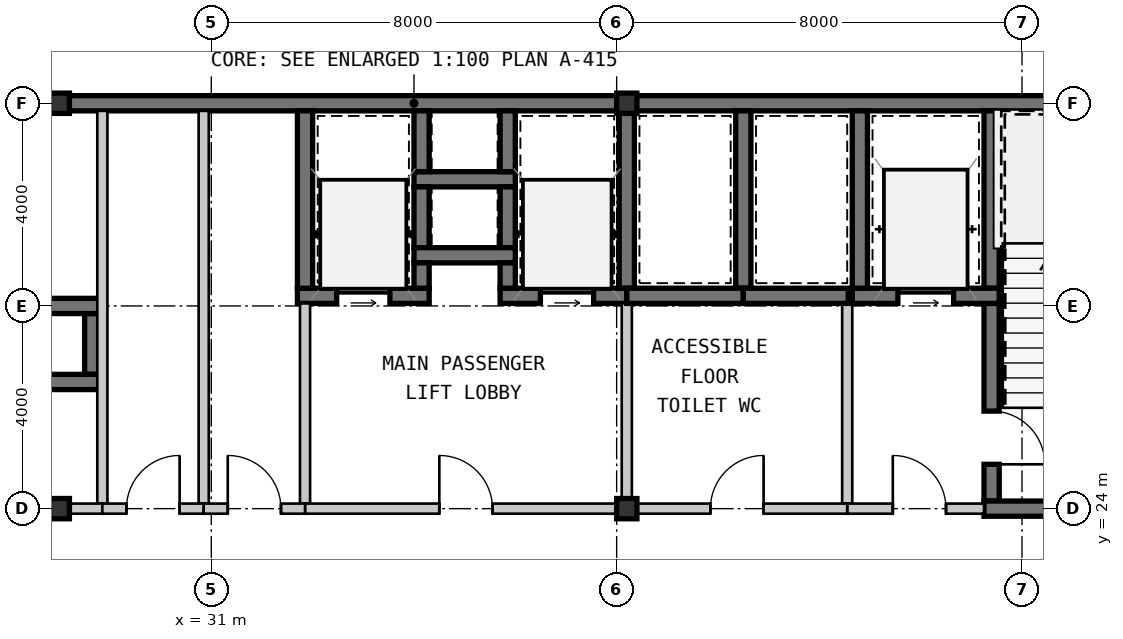
"""IFC4 building model, lengths in metres.
Left out: names, types, materials, properties, quantities, classifications, styles, units other than length and angle.
Written with IfcOpenShell. Run it as: python <this file> out.ifc"""

import sys

from ifc_helpers import new_model, si_unit, direction, frame, frame_2d, origin, origin_2d, place, context, subcontext, project, spatial, rectangle, hollow_rectangle, extrude, source, transform, mapped, element, fill, save


model = new_model("IFC4")
c1 = context("Model", 3, precision=1e-05, world=origin(), true_north=direction((0.0, 1.0)))
c2 = subcontext(c1, "Body", "Model", "MODEL_VIEW")
j1 = project(units=[si_unit("LENGTHUNIT", "METRE"), si_unit("PLANEANGLEUNIT", "RADIAN")], contexts=[c1])
p1 = place(None, origin())
s1 = spatial("IfcSite", under=j1, at=p1, CompositionType="ELEMENT")
p2 = place(p1, origin())
s2 = spatial("IfcBuilding", under=s1, at=p2, CompositionType="ELEMENT")
p3 = place(p2, frame((0.0, 0.0, 151.9)))
s3 = spatial("IfcBuildingStorey", under=s2, at=p3, CompositionType="ELEMENT", Elevation=151.9)
m1 = source(origin(), c2, "Body", "SweptSolid", [
    extrude(hollow_rectangle(XDim=0.4, YDim=0.4, WallThickness=0.016, at=origin_2d()), origin(), (0.0, 0.0, 1.0), 3.15),
])
for number, where, z_axis, x_axis in (
    (1, (28.0, 24.0, 0.0), (0.0, 0.0, 1.0), (1.0, 0.0, 0.0)),
    (2, (39.2, 24.0, 0.0), (0.0, 0.0, 1.0), (1.0, 0.0, 0.0)),
    (3, (28.0, 32.0, 0.0), (0.0, 0.0, 1.0), (1.0, 0.0, 0.0)),
    (4, (39.2, 32.0, 0.0), (0.0, 0.0, 1.0), (1.0, 0.0, 0.0)),
):
    element("IfcColumn", number, at=place(p3, frame(where, z_axis=z_axis, x_axis=x_axis)), inside=s3, PredefinedType="COLUMN", context=c2, shape_type="MappedRepresentation", body=[
        mapped(m1, transform((0.0, 0.0, 0.0), scale=1.0)),
    ])
m2 = source(origin(), c2, "Body", "SweptSolid", [
    extrude(rectangle(XDim=9.15, YDim=0.3, at=frame_2d((4.575, 0.0))), origin(), (0.0, 0.0, 1.0), 2.93),
])
p4 = place(p3, frame((18.85, 32.0, 0.0), z_axis=(0.0, 0.0, 1.0), x_axis=(1.0, 0.0, 0.0)))
e5 = element("IfcWall", 5, at=p4, inside=s3, PredefinedType="SHEAR", context=c2, shape_type="MappedRepresentation", body=[
    mapped(m2, transform((0.0, 0.0, 0.0), scale=1.0)),
])
m3 = source(origin(), c2, "Body", "SweptSolid", [
    extrude(rectangle(XDim=11.2, YDim=0.3, at=frame_2d((5.6, 0.0))), origin(), (0.0, 0.0, 1.0), 2.93),
])
p5 = place(p3, frame((28.0, 32.0, 0.0), z_axis=(0.0, 0.0, 1.0), x_axis=(1.0, 0.0, 0.0)))
e6 = element("IfcWall", 6, at=p5, inside=s3, PredefinedType="SHEAR", context=c2, shape_type="MappedRepresentation", body=[
    mapped(m3, transform((0.0, 0.0, 0.0), scale=1.0)),
])
m4 = source(origin(), c2, "Body", "SweptSolid", [
    extrude(rectangle(XDim=11.95, YDim=0.3, at=frame_2d((5.975, 0.0))), origin(), (0.0, 0.0, 1.0), 2.93),
])
p6 = place(p3, frame((39.2, 32.0, 0.0), z_axis=(0.0, 0.0, 1.0), x_axis=(1.0, 0.0, 0.0)))
e7 = element("IfcWall", 7, at=p6, inside=s3, PredefinedType="SHEAR", context=c2, shape_type="MappedRepresentation", body=[
    mapped(m4, transform((0.0, 0.0, 0.0), scale=1.0)),
])
m5 = source(origin(), c2, "Body", "SweptSolid", [
    extrude(rectangle(XDim=3.5, YDim=0.3, at=frame_2d((1.75, 0.0))), origin(), (0.0, 0.0, 1.0), 2.93),
])
p7 = place(p3, frame((46.4, 31.85, 0.0), z_axis=(0.0, 0.0, 1.0), x_axis=(0.0, -1.0, 0.0)))
e8 = element("IfcWall", 8, at=p7, inside=s3, PredefinedType="SHEAR", context=c2, shape_type="MappedRepresentation", body=[
    mapped(m5, transform((0.0, 0.0, 0.0), scale=1.0)),
])
m6 = source(origin(), c2, "Body", "SweptSolid", [
    extrude(rectangle(XDim=3.9, YDim=0.3, at=frame_2d((1.95, 0.0))), origin(), (0.0, 0.0, 1.0), 2.93),
])
p8 = place(p3, frame((46.4, 28.05, 0.0), z_axis=(0.0, 0.0, 1.0), x_axis=(0.0, -1.0, 0.0)))
e9 = element("IfcWall", 9, at=p8, inside=s3, PredefinedType="SHEAR", context=c2, shape_type="MappedRepresentation", body=[
    mapped(m6, transform((0.0, 0.0, 0.0), scale=1.0)),
])
m7 = source(origin(), c2, "Body", "SweptSolid", [
    extrude(rectangle(XDim=1.05, YDim=2.1, at=frame_2d((0.525, 1.05))), frame((0.0, 0.16, 0.0), z_axis=(0.0, -1.0, 0.0), x_axis=(1.0, 0.0, 0.0)), (0.0, 0.0, 1.0), 0.32),
])
p9 = place(p8, frame((2.125, 0.0, 0.0)))
e10 = element("IfcOpeningElement", 10, at=p9, cuts=e9, PredefinedType="OPENING", context=c2, shape_type="MappedRepresentation", body=[
    mapped(m7, transform((0.0, 0.0, 0.0), scale=1.0)),
])
m8 = source(origin(), c2, "Body", "SweptSolid", [
    extrude(rectangle(XDim=4.9, YDim=0.3, at=frame_2d((2.45, 0.0))), origin(), (0.0, 0.0, 1.0), 2.93),
])
p10 = place(p3, frame((46.25, 24.0, 0.0), z_axis=(0.0, 0.0, 1.0), x_axis=(1.0, 0.0, 0.0)))
e11 = element("IfcWall", 11, at=p10, inside=s3, PredefinedType="SHEAR", context=c2, shape_type="MappedRepresentation", body=[
    mapped(m8, transform((0.0, 0.0, 0.0), scale=1.0)),
])
m9 = source(origin(), c2, "Body", "SweptSolid", [
    extrude(rectangle(XDim=2.9, YDim=0.3, at=frame_2d((1.45, 0.0))), origin(), (0.0, 0.0, 1.0), 2.93),
])
p11 = place(p3, frame((43.65, 28.2, 0.0), z_axis=(0.0, 0.0, 1.0), x_axis=(1.0, 0.0, 0.0)))
e12 = element("IfcWall", 12, at=p11, inside=s3, PredefinedType="SHEAR", context=c2, shape_type="MappedRepresentation", body=[
    mapped(m9, transform((0.0, 0.0, 0.0), scale=1.0)),
])
m10 = source(origin(), c2, "Body", "SweptSolid", [
    extrude(rectangle(XDim=1.1, YDim=2.15, at=frame_2d((0.55, 1.075))), frame((0.0, 0.16, 0.0), z_axis=(0.0, -1.0, 0.0), x_axis=(1.0, 0.0, 0.0)), (0.0, 0.0, 1.0), 0.32),
])
p12 = place(p11, frame((0.9, 0.0, 0.0)))
e13 = element("IfcOpeningElement", 13, at=p12, cuts=e12, PredefinedType="OPENING", context=c2, shape_type="MappedRepresentation", body=[
    mapped(m10, transform((0.0, 0.0, 0.0), scale=1.0)),
])
p13 = place(p3, frame((43.8, 31.85, 0.0), z_axis=(0.0, 0.0, 1.0), x_axis=(0.0, -1.0, 0.0)))
e14 = element("IfcWall", 14, at=p13, inside=s3, PredefinedType="SHEAR", context=c2, shape_type="MappedRepresentation", body=[
    mapped(m5, transform((0.0, 0.0, 0.0), scale=1.0)),
])
m11 = source(origin(), c2, "Body", "SweptSolid", [
    extrude(rectangle(XDim=3.95, YDim=0.2, at=frame_2d((1.975, 0.0))), origin(), (0.0, 0.0, 1.0), 2.93),
])
p14 = place(p3, frame((43.55, 28.05, 0.0), z_axis=(0.0, 0.0, 1.0), x_axis=(0.0, -1.0, 0.0)))
e15 = element("IfcWall", 15, at=p14, inside=s3, PredefinedType="SOLIDWALL", context=c2, shape_type="MappedRepresentation", body=[
    mapped(m11, transform((0.0, 0.0, 0.0), scale=1.0)),
])
m12 = source(origin(), c2, "Body", "SweptSolid", [
    extrude(rectangle(XDim=2.7, YDim=0.2, at=frame_2d((1.35, 0.0))), origin(), (0.0, 0.0, 1.0), 2.397),
])
p15 = place(p3, frame((43.55, 24.0, 0.0), z_axis=(0.0, 0.0, 1.0), x_axis=(1.0, 0.0, 0.0)))
e16 = element("IfcWall", 16, at=p15, inside=s3, PredefinedType="SOLIDWALL", context=c2, shape_type="MappedRepresentation", body=[
    mapped(m12, transform((0.0, 0.0, 0.0), scale=1.0)),
])
m13 = source(origin(), c2, "Body", "SweptSolid", [
    extrude(rectangle(XDim=1.05, YDim=2.1, at=frame_2d((0.525, 1.05))), frame((0.0, 0.11, 0.0), z_axis=(0.0, -1.0, 0.0), x_axis=(1.0, 0.0, 0.0)), (0.0, 0.0, 1.0), 0.22),
])
p16 = place(p15, frame((0.9, 0.0, 0.0)))
e17 = element("IfcOpeningElement", 17, at=p16, cuts=e16, PredefinedType="OPENING", context=c2, shape_type="MappedRepresentation", body=[
    mapped(m13, transform((0.0, 0.0, 0.0), scale=1.0)),
])
m14 = source(origin(), c2, "Body", "SweptSolid", [
    extrude(rectangle(XDim=2.0, YDim=0.3, at=frame_2d((1.0, 0.0))), origin(), (0.0, 0.0, 1.0), 2.93),
])
p17 = place(p3, frame((35.0, 30.5, 0.0), z_axis=(0.0, 0.0, 1.0), x_axis=(1.0, 0.0, 0.0)))
e18 = element("IfcWall", 18, at=p17, inside=s3, PredefinedType="SHEAR", context=c2, shape_type="MappedRepresentation", body=[
    mapped(m14, transform((0.0, 0.0, 0.0), scale=1.0)),
])
m15 = source(origin(), c2, "Body", "SweptSolid", [
    extrude(rectangle(XDim=1.2, YDim=0.3, at=frame_2d((0.6, 0.0))), origin(), (0.0, 0.0, 1.0), 2.93),
])
for number, where, z_axis, x_axis in (
    (19, (35.15, 31.85, 0.0), (0.0, 0.0, 1.0), (0.0, -1.0, 0.0)),
    (20, (36.85, 30.65, 0.0), (0.0, 0.0, 1.0), (0.0, 1.0, 0.0)),
    (21, (35.15, 30.35, 0.0), (0.0, 0.0, 1.0), (0.0, -1.0, 0.0)),
    (22, (36.85, 29.15, 0.0), (0.0, 0.0, 1.0), (0.0, 1.0, 0.0)),
):
    element("IfcWall", number, at=place(p3, frame(where, z_axis=z_axis, x_axis=x_axis)), inside=s3, PredefinedType="SHEAR", context=c2, shape_type="MappedRepresentation", body=[
        mapped(m15, transform((0.0, 0.0, 0.0), scale=1.0)),
    ])
p18 = place(p3, frame((35.0, 29.0, 0.0), z_axis=(0.0, 0.0, 1.0), x_axis=(1.0, 0.0, 0.0)))
e23 = element("IfcWall", 23, at=p18, inside=s3, PredefinedType="SHEAR", context=c2, shape_type="MappedRepresentation", body=[
    mapped(m14, transform((0.0, 0.0, 0.0), scale=1.0)),
])
p19 = place(p3, frame((28.65, 26.65, 0.0), z_axis=(0.0, 0.0, 1.0), x_axis=(0.0, 1.0, 0.0)))
e24 = element("IfcWall", 24, at=p19, inside=s3, PredefinedType="SHEAR", context=c2, shape_type="MappedRepresentation", body=[
    mapped(m15, transform((0.0, 0.0, 0.0), scale=1.0)),
])
m16 = source(origin(), c2, "Body", "SweptSolid", [
    extrude(rectangle(XDim=1.7, YDim=0.3, at=frame_2d((0.85, 0.0))), origin(), (0.0, 0.0, 1.0), 2.93),
])
for number, where, z_axis, x_axis in (
    (25, (28.8, 28.0, 0.0), (0.0, 0.0, 1.0), (-1.0, 0.0, 0.0)),
    (26, (27.1, 26.5, 0.0), (0.0, 0.0, 1.0), (1.0, 0.0, 0.0)),
):
    element("IfcWall", number, at=place(p3, frame(where, z_axis=z_axis, x_axis=x_axis)), inside=s3, PredefinedType="SHEAR", context=c2, shape_type="MappedRepresentation", body=[
        mapped(m16, transform((0.0, 0.0, 0.0), scale=1.0)),
    ])
m17 = source(origin(), c2, "Body", "SweptSolid", [
    extrude(rectangle(XDim=2.6, YDim=0.3, at=frame_2d((1.3, 0.0))), origin(), (0.0, 0.0, 1.0), 2.93),
])
p20 = place(p3, frame((32.7, 28.2, 0.0), z_axis=(0.0, 0.0, 1.0), x_axis=(1.0, 0.0, 0.0)))
e27 = element("IfcWall", 27, at=p20, inside=s3, PredefinedType="SHEAR", context=c2, shape_type="MappedRepresentation", body=[
    mapped(m17, transform((0.0, 0.0, 0.0), scale=1.0)),
])
m18 = source(origin(), c2, "Body", "SweptSolid", [
    extrude(rectangle(XDim=1.05, YDim=2.15, at=frame_2d((0.525, 1.075))), frame((0.0, 0.16, 0.0), z_axis=(0.0, -1.0, 0.0), x_axis=(1.0, 0.0, 0.0)), (0.0, 0.0, 1.0), 0.32),
])
p21 = place(p20, frame((0.775, 0.0, 0.0)))
e28 = element("IfcOpeningElement", 28, at=p21, cuts=e27, PredefinedType="OPENING", context=c2, shape_type="MappedRepresentation", body=[
    mapped(m18, transform((0.0, 0.0, 0.0), scale=1.0)),
])
m19 = source(origin(), c2, "Body", "SweptSolid", [
    extrude(rectangle(XDim=0.5, YDim=0.3, at=frame_2d((0.25, 0.0))), origin(), (0.0, 0.0, 1.0), 2.93),
])
p22 = place(p3, frame((35.15, 28.35, 0.0), z_axis=(0.0, 0.0, 1.0), x_axis=(0.0, 1.0, 0.0)))
e29 = element("IfcWall", 29, at=p22, inside=s3, PredefinedType="SHEAR", context=c2, shape_type="MappedRepresentation", body=[
    mapped(m19, transform((0.0, 0.0, 0.0), scale=1.0)),
])
p23 = place(p3, frame((32.85, 31.85, 0.0), z_axis=(0.0, 0.0, 1.0), x_axis=(0.0, -1.0, 0.0)))
e30 = element("IfcWall", 30, at=p23, inside=s3, PredefinedType="SHEAR", context=c2, shape_type="MappedRepresentation", body=[
    mapped(m5, transform((0.0, 0.0, 0.0), scale=1.0)),
])
m20 = source(origin(), c2, "Body", "SweptSolid", [
    extrude(rectangle(XDim=2.5, YDim=0.3, at=frame_2d((1.25, 0.0))), origin(), (0.0, 0.0, 1.0), 2.93),
])
p24 = place(p3, frame((36.7, 28.2, 0.0), z_axis=(0.0, 0.0, 1.0), x_axis=(1.0, 0.0, 0.0)))
e31 = element("IfcWall", 31, at=p24, inside=s3, PredefinedType="SHEAR", context=c2, shape_type="MappedRepresentation", body=[
    mapped(m20, transform((0.0, 0.0, 0.0), scale=1.0)),
])
p25 = place(p24, frame((0.795, 0.0, 0.0)))
e32 = element("IfcOpeningElement", 32, at=p25, cuts=e31, PredefinedType="OPENING", context=c2, shape_type="MappedRepresentation", body=[
    mapped(m18, transform((0.0, 0.0, 0.0), scale=1.0)),
])
p26 = place(p3, frame((36.85, 28.85, 0.0), z_axis=(0.0, 0.0, 1.0), x_axis=(0.0, -1.0, 0.0)))
e33 = element("IfcWall", 33, at=p26, inside=s3, PredefinedType="SHEAR", context=c2, shape_type="MappedRepresentation", body=[
    mapped(m19, transform((0.0, 0.0, 0.0), scale=1.0)),
])
p27 = place(p3, frame((39.2, 28.35, 0.0), z_axis=(0.0, 0.0, 1.0), x_axis=(0.0, 1.0, 0.0)))
e34 = element("IfcWall", 34, at=p27, inside=s3, PredefinedType="SHEAR", context=c2, shape_type="MappedRepresentation", body=[
    mapped(m5, transform((0.0, 0.0, 0.0), scale=1.0)),
])
p28 = place(p3, frame((32.85, 24.1, 0.0), z_axis=(0.0, 0.0, 1.0), x_axis=(0.0, 1.0, 0.0)))
e35 = element("IfcWall", 35, at=p28, inside=s3, PredefinedType="SOLIDWALL", context=c2, shape_type="MappedRepresentation", body=[
    mapped(m11, transform((0.0, 0.0, 0.0), scale=1.0)),
])
m21 = source(origin(), c2, "Body", "SweptSolid", [
    extrude(rectangle(XDim=3.95, YDim=0.2, at=frame_2d((1.975, 0.0))), origin(), (0.0, 0.0, 1.0), 2.47),
])
p29 = place(p3, frame((39.2, 28.05, 0.0), z_axis=(0.0, 0.0, 1.0), x_axis=(0.0, -1.0, 0.0)))
e36 = element("IfcWall", 36, at=p29, inside=s3, PredefinedType="SOLIDWALL", context=c2, shape_type="MappedRepresentation", body=[
    mapped(m21, transform((0.0, 0.0, 0.0), scale=1.0)),
])
m22 = source(origin(), c2, "Body", "SweptSolid", [
    extrude(rectangle(XDim=6.35, YDim=0.2, at=frame_2d((3.175, 0.0))), origin(), (0.0, 0.0, 1.0), 2.47),
])
p30 = place(p3, frame((39.2, 24.0, 0.0), z_axis=(0.0, 0.0, 1.0), x_axis=(-1.0, 0.0, 0.0)))
e37 = element("IfcWall", 37, at=p30, inside=s3, PredefinedType="SOLIDWALL", context=c2, shape_type="MappedRepresentation", body=[
    mapped(m22, transform((0.0, 0.0, 0.0), scale=1.0)),
])
p31 = place(p30, frame((2.65, 0.0, 0.0)))
e38 = element("IfcOpeningElement", 38, at=p31, cuts=e37, PredefinedType="OPENING", context=c2, shape_type="MappedRepresentation", body=[
    mapped(m13, transform((0.0, 0.0, 0.0), scale=1.0)),
])
p32 = place(p3, frame((41.5, 28.35, 0.0), z_axis=(0.0, 0.0, 1.0), x_axis=(0.0, 1.0, 0.0)))
e39 = element("IfcWall", 39, at=p32, inside=s3, PredefinedType="SHEAR", context=c2, shape_type="MappedRepresentation", body=[
    mapped(m5, transform((0.0, 0.0, 0.0), scale=1.0)),
])
m23 = source(origin(), c2, "Body", "SweptSolid", [
    extrude(rectangle(XDim=2.3, YDim=0.3, at=frame_2d((1.15, 0.0))), origin(), (0.0, 0.0, 1.0), 2.93),
])
p33 = place(p3, frame((39.2, 28.2, 0.0), z_axis=(0.0, 0.0, 1.0), x_axis=(1.0, 0.0, 0.0)))
e40 = element("IfcWall", 40, at=p33, inside=s3, PredefinedType="SHEAR", context=c2, shape_type="MappedRepresentation", body=[
    mapped(m23, transform((0.0, 0.0, 0.0), scale=1.0)),
])
m24 = source(origin(), c2, "Body", "SweptSolid", [
    extrude(rectangle(XDim=2.07, YDim=0.3, at=frame_2d((1.035, 0.0))), origin(), (0.0, 0.0, 1.0), 2.93),
])
p34 = place(p3, frame((41.5, 28.2, 0.0), z_axis=(0.0, 0.0, 1.0), x_axis=(1.0, 0.0, 0.0)))
e41 = element("IfcWall", 41, at=p34, inside=s3, PredefinedType="SHEAR", context=c2, shape_type="MappedRepresentation", body=[
    mapped(m24, transform((0.0, 0.0, 0.0), scale=1.0)),
])
m25 = source(origin(), c2, "Body", "SweptSolid", [
    extrude(rectangle(XDim=7.75, YDim=0.2, at=frame_2d((3.875, 0.0))), origin(), (0.0, 0.0, 1.0), 2.93),
])
p35 = place(p3, frame((28.85, 31.85, 0.0), z_axis=(0.0, 0.0, 1.0), x_axis=(0.0, -1.0, 0.0)))
e42 = element("IfcWall", 42, at=p35, inside=s3, PredefinedType="SOLIDWALL", context=c2, shape_type="MappedRepresentation", body=[
    mapped(m25, transform((0.0, 0.0, 0.0), scale=1.0)),
])
m26 = source(origin(), c2, "Body", "SweptSolid", [
    extrude(rectangle(XDim=2.4, YDim=0.2, at=frame_2d((1.2, 0.0))), origin(), (0.0, 0.0, 1.0), 2.47),
])
p36 = place(p3, frame((28.85, 24.0, 0.0), z_axis=(0.0, 0.0, 1.0), x_axis=(-1.0, 0.0, 0.0)))
e43 = element("IfcWall", 43, at=p36, inside=s3, PredefinedType="SOLIDWALL", context=c2, shape_type="MappedRepresentation", body=[
    mapped(m26, transform((0.0, 0.0, 0.0), scale=1.0)),
])
p37 = place(p3, frame((30.85, 31.85, 0.0), z_axis=(0.0, 0.0, 1.0), x_axis=(0.0, -1.0, 0.0)))
e44 = element("IfcWall", 44, at=p37, inside=s3, PredefinedType="SOLIDWALL", context=c2, shape_type="MappedRepresentation", body=[
    mapped(m25, transform((0.0, 0.0, 0.0), scale=1.0)),
])
m27 = source(origin(), c2, "Body", "SweptSolid", [
    extrude(rectangle(XDim=2.0, YDim=0.2, at=frame_2d((1.0, 0.0))), origin(), (0.0, 0.0, 1.0), 2.47),
])
p38 = place(p3, frame((30.85, 24.0, 0.0), z_axis=(0.0, 0.0, 1.0), x_axis=(-1.0, 0.0, 0.0)))
e45 = element("IfcWall", 45, at=p38, inside=s3, PredefinedType="SOLIDWALL", context=c2, shape_type="MappedRepresentation", body=[
    mapped(m27, transform((0.0, 0.0, 0.0), scale=1.0)),
])
p39 = place(p38, frame((0.475, 0.0, 0.0)))
e46 = element("IfcOpeningElement", 46, at=p39, cuts=e45, PredefinedType="OPENING", context=c2, shape_type="MappedRepresentation", body=[
    mapped(m13, transform((0.0, 0.0, 0.0), scale=1.0)),
])
p40 = place(p3, frame((32.85, 24.0, 0.0), z_axis=(0.0, 0.0, 1.0), x_axis=(-1.0, 0.0, 0.0)))
e47 = element("IfcWall", 47, at=p40, inside=s3, PredefinedType="SOLIDWALL", context=c2, shape_type="MappedRepresentation", body=[
    mapped(m27, transform((0.0, 0.0, 0.0), scale=1.0)),
])
p41 = place(p40, frame((0.475, 0.0, 0.0)))
e48 = element("IfcOpeningElement", 48, at=p41, cuts=e47, PredefinedType="OPENING", context=c2, shape_type="MappedRepresentation", body=[
    mapped(m13, transform((0.0, 0.0, 0.0), scale=1.0)),
])
m28 = source(origin(), c2, "Body", "SweptSolid", [
    extrude(rectangle(XDim=4.35, YDim=0.2, at=frame_2d((2.175, 0.0))), origin(), (0.0, 0.0, 1.0), 2.397),
])
p42 = place(p3, frame((43.55, 24.0, 0.0), z_axis=(0.0, 0.0, 1.0), x_axis=(-1.0, 0.0, 0.0)))
e49 = element("IfcWall", 49, at=p42, inside=s3, PredefinedType="SOLIDWALL", context=c2, shape_type="MappedRepresentation", body=[
    mapped(m28, transform((0.0, 0.0, 0.0), scale=1.0)),
])
p43 = place(p42, frame((1.65, 0.0, 0.0)))
e50 = element("IfcOpeningElement", 50, at=p43, cuts=e49, PredefinedType="OPENING", context=c2, shape_type="MappedRepresentation", body=[
    mapped(m13, transform((0.0, 0.0, 0.0), scale=1.0)),
])
m29 = source(origin(), c2, "Body", "SweptSolid", [
    extrude(rectangle(XDim=1.05, YDim=2.1, at=frame_2d((0.525, 1.05))), frame((0.0, 0.025, 0.0), z_axis=(0.0, -1.0, 0.0), x_axis=(1.0, 0.0, 0.0)), (0.0, 0.0, 1.0), 0.05),
])
p44 = place(p9, origin())
e51 = element("IfcDoor", 51, at=p44, inside=s3, OperationType="SINGLE_SWING_RIGHT", PredefinedType="DOOR", context=c2, shape_type="MappedRepresentation", body=[
    mapped(m29, transform((0.0, 0.0, 0.0), scale=1.0)),
])
fill(e10, e51)
m30 = source(origin(), c2, "Body", "SweptSolid", [
    extrude(rectangle(XDim=1.1, YDim=2.15, at=frame_2d((0.55, 1.075))), frame((0.0, 0.025, 0.0), z_axis=(0.0, -1.0, 0.0), x_axis=(1.0, 0.0, 0.0)), (0.0, 0.0, 1.0), 0.05),
])
p45 = place(p12, origin())
e52 = element("IfcDoor", 52, at=p45, inside=s3, OperationType="SLIDING_TO_LEFT", PredefinedType="DOOR", context=c2, shape_type="MappedRepresentation", body=[
    mapped(m30, transform((0.0, 0.0, 0.0), scale=1.0)),
])
fill(e13, e52)
p46 = place(p16, origin())
e53 = element("IfcDoor", 53, at=p46, inside=s3, OperationType="SINGLE_SWING_LEFT", PredefinedType="DOOR", context=c2, shape_type="MappedRepresentation", body=[
    mapped(m29, transform((0.0, 0.0, 0.0), scale=1.0)),
])
fill(e17, e53)
m31 = source(origin(), c2, "Body", "SweptSolid", [
    extrude(rectangle(XDim=1.05, YDim=2.15, at=frame_2d((0.525, 1.075))), frame((0.0, 0.025, 0.0), z_axis=(0.0, -1.0, 0.0), x_axis=(1.0, 0.0, 0.0)), (0.0, 0.0, 1.0), 0.05),
])
p47 = place(p21, origin())
e54 = element("IfcDoor", 54, at=p47, inside=s3, OperationType="SLIDING_TO_LEFT", PredefinedType="DOOR", context=c2, shape_type="MappedRepresentation", body=[
    mapped(m31, transform((0.0, 0.0, 0.0), scale=1.0)),
])
fill(e28, e54)
p48 = place(p25, origin())
e55 = element("IfcDoor", 55, at=p48, inside=s3, OperationType="SLIDING_TO_LEFT", PredefinedType="DOOR", context=c2, shape_type="MappedRepresentation", body=[
    mapped(m31, transform((0.0, 0.0, 0.0), scale=1.0)),
])
fill(e32, e55)
p49 = place(p31, frame((1.05, 0.0, 0.0), z_axis=(0.0, 0.0, 1.0), x_axis=(-1.0, 0.0, 0.0)))
e56 = element("IfcDoor", 56, at=p49, inside=s3, OperationType="SINGLE_SWING_LEFT", PredefinedType="DOOR", context=c2, shape_type="MappedRepresentation", body=[
    mapped(m29, transform((0.0, 0.0, 0.0), scale=1.0)),
])
fill(e38, e56)
p50 = place(p39, frame((1.05, 0.0, 0.0), z_axis=(0.0, 0.0, 1.0), x_axis=(-1.0, 0.0, 0.0)))
e57 = element("IfcDoor", 57, at=p50, inside=s3, OperationType="SINGLE_SWING_RIGHT", PredefinedType="DOOR", context=c2, shape_type="MappedRepresentation", body=[
    mapped(m29, transform((0.0, 0.0, 0.0), scale=1.0)),
])
fill(e46, e57)
p51 = place(p41, frame((1.05, 0.0, 0.0), z_axis=(0.0, 0.0, 1.0), x_axis=(-1.0, 0.0, 0.0)))
e58 = element("IfcDoor", 58, at=p51, inside=s3, OperationType="SINGLE_SWING_LEFT", PredefinedType="DOOR", context=c2, shape_type="MappedRepresentation", body=[
    mapped(m29, transform((0.0, 0.0, 0.0), scale=1.0)),
])
fill(e48, e58)
p52 = place(p43, frame((1.05, 0.0, 0.0), z_axis=(0.0, 0.0, 1.0), x_axis=(-1.0, 0.0, 0.0)))
e59 = element("IfcDoor", 59, at=p52, inside=s3, OperationType="SINGLE_SWING_RIGHT", PredefinedType="DOOR", context=c2, shape_type="MappedRepresentation", body=[
    mapped(m29, transform((0.0, 0.0, 0.0), scale=1.0)),
])
fill(e50, e59)
save(model, sys.argv[1])
